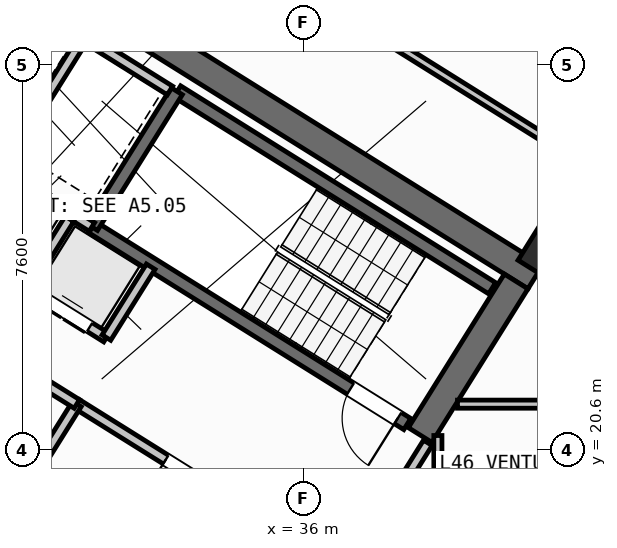
"""IFC4 building model, lengths in metres.
Left out: names, types, materials, properties, quantities, classifications, styles, units other than length and angle.
Written with IfcOpenShell. Run it as: python <this file> out.ifc"""

import sys

from ifc_helpers import new_model, si_unit, direction, frame, frame_2d, origin, origin_2d, place, context, subcontext, project, spatial, rectangle, hollow_rectangle, extrude, source, transform, mapped, element, fill, save


model = new_model("IFC4")
c1 = context("Model", 3, precision=1e-05, world=origin(), true_north=direction((0.0, 1.0)))
c2 = subcontext(c1, "Body", "Model", "MODEL_VIEW")
j1 = project(units=[si_unit("LENGTHUNIT", "METRE"), si_unit("PLANEANGLEUNIT", "RADIAN")], contexts=[c1])
p1 = place(None, origin())
s1 = spatial("IfcSite", under=j1, at=p1, CompositionType="ELEMENT")
p2 = place(p1, origin())
s2 = spatial("IfcBuilding", under=s1, at=p2, CompositionType="ELEMENT")
p3 = place(p2, frame((0.0, 0.0, 184.2)))
s3 = spatial("IfcBuildingStorey", under=s2, at=p3, CompositionType="ELEMENT", Elevation=184.2)
p4 = place(p3, frame((40.573, 24.01, 0.0), z_axis=(0.0, 0.0, 1.0), x_axis=(-0.848047359947, 0.529920442413, 0.0)))
e1 = element("IfcWall", 1, at=p4, inside=s3, PredefinedType="SHEAR", context=c2, shape_type="SweptSolid", body=[
    extrude(rectangle(XDim=13.14, YDim=0.55, at=frame_2d((6.57, 0.0))), origin(), (0.0, 0.0, 1.0), 3.35),
])
p5 = place(p3, frame((40.194, 23.922, 0.0), z_axis=(0.0, 0.0, 1.0), x_axis=(-0.529888438328, -0.848067357541, 0.0)))
e2 = element("IfcWall", 2, at=p5, inside=s3, PredefinedType="SHEAR", context=c2, shape_type="SweptSolid", body=[
    extrude(rectangle(XDim=3.575, YDim=0.55, at=frame_2d((1.788, 0.0))), origin(), (0.0, 0.0, 1.0), 3.35),
])
m1 = source(origin(), c2, "Body", "SweptSolid", [
    extrude(hollow_rectangle(XDim=0.8, YDim=0.8, WallThickness=0.032, at=origin_2d()), origin(), (0.0, 0.0, 1.0), 3.6),
])
p6 = place(p3, frame((40.783, 24.469, 0.0), z_axis=(0.0, 0.0, 1.0), x_axis=(-0.848048096156, 0.529919264233, 0.0)))
e3 = element("IfcColumn", 3, at=p6, inside=s3, PredefinedType="COLUMN", context=c2, shape_type="MappedRepresentation", body=[
    mapped(m1, transform((0.0, 0.0, 0.0), scale=1.0)),
])
p7 = place(p3, frame((31.76, 12.183, 0.0), z_axis=(0.0, 0.0, 1.0), x_axis=(-0.848047074256, 0.529920899612, 0.0)))
e4 = element("IfcWall", 4, at=p7, inside=s3, PredefinedType="STANDARD", context=c2, shape_type="SweptSolid", body=[
    extrude(rectangle(XDim=30.652, YDim=0.32, at=frame_2d((15.326, 0.0))), origin(), (0.0, 0.0, 1.0), 3.35),
])
p8 = place(p7, frame((15.166, 0.0, 0.0)))
e5 = element("IfcOpeningElement", 5, at=p8, cuts=e4, PredefinedType="OPENING", context=c2, shape_type="SweptSolid", body=[
    extrude(rectangle(XDim=1.2, YDim=2.15, at=frame_2d((0.6, 1.075))), frame((0.0, 0.17, 0.0), z_axis=(0.0, -1.0, 0.0), x_axis=(1.0, 0.0, 0.0)), (0.0, 0.0, 1.0), 0.34),
])
p9 = place(p7, frame((2.015, 0.0, 0.8)))
e6 = element("IfcOpeningElement", 6, at=p9, cuts=e4, PredefinedType="OPENING", context=c2, shape_type="SweptSolid", body=[
    extrude(rectangle(XDim=2.1, YDim=1.55, at=frame_2d((1.05, 0.775))), frame((0.0, 0.17, 0.0), z_axis=(0.0, -1.0, 0.0), x_axis=(1.0, 0.0, 0.0)), (0.0, 0.0, 1.0), 0.34),
])
p10 = place(p7, frame((7.244, 0.0, 0.8)))
e7 = element("IfcOpeningElement", 7, at=p10, cuts=e4, PredefinedType="OPENING", context=c2, shape_type="SweptSolid", body=[
    extrude(rectangle(XDim=2.1, YDim=1.55, at=frame_2d((1.05, 0.775))), frame((0.0, 0.17, 0.0), z_axis=(0.0, -1.0, 0.0), x_axis=(1.0, 0.0, 0.0)), (0.0, 0.0, 1.0), 0.34),
])
p11 = place(p7, frame((12.623, 0.0, 1.0)))
e8 = element("IfcOpeningElement", 8, at=p11, cuts=e4, PredefinedType="OPENING", context=c2, shape_type="SweptSolid", body=[
    extrude(rectangle(XDim=0.9, YDim=1.25, at=frame_2d((0.45, 0.625))), frame((0.0, 0.17, 0.0), z_axis=(0.0, -1.0, 0.0), x_axis=(1.0, 0.0, 0.0)), (0.0, 0.0, 1.0), 0.34),
])
p12 = place(p7, frame((19.565, 0.0, 0.95)))
e9 = element("IfcOpeningElement", 9, at=p12, cuts=e4, PredefinedType="OPENING", context=c2, shape_type="SweptSolid", body=[
    extrude(rectangle(XDim=1.2, YDim=1.4, at=frame_2d((0.6, 0.7))), frame((0.0, 0.17, 0.0), z_axis=(0.0, -1.0, 0.0), x_axis=(1.0, 0.0, 0.0)), (0.0, 0.0, 1.0), 0.34),
])
p13 = place(p7, frame((25.983, 0.0, 1.0)))
e10 = element("IfcOpeningElement", 10, at=p13, cuts=e4, PredefinedType="OPENING", context=c2, shape_type="SweptSolid", body=[
    extrude(rectangle(XDim=0.9, YDim=1.25, at=frame_2d((0.45, 0.625))), frame((0.0, 0.17, 0.0), z_axis=(0.0, -1.0, 0.0), x_axis=(1.0, 0.0, 0.0)), (0.0, 0.0, 1.0), 0.34),
])
p14 = place(p7, frame((28.433, 0.0, 1.0)))
e11 = element("IfcOpeningElement", 11, at=p14, cuts=e4, PredefinedType="OPENING", context=c2, shape_type="SweptSolid", body=[
    extrude(rectangle(XDim=0.9, YDim=1.25, at=frame_2d((0.45, 0.625))), frame((0.0, 0.17, 0.0), z_axis=(0.0, -1.0, 0.0), x_axis=(1.0, 0.0, 0.0)), (0.0, 0.0, 1.0), 0.34),
])
p15 = place(p3, frame((31.28, 18.261, 0.0), z_axis=(0.0, 0.0, 1.0), x_axis=(-0.848051618787, 0.529913626805, 0.0)))
e12 = element("IfcWall", 12, at=p15, inside=s3, PredefinedType="SHEAR", context=c2, shape_type="SweptSolid", body=[
    extrude(rectangle(XDim=7.46, YDim=0.26, at=frame_2d((3.73, 0.0))), origin(), (0.0, 0.0, 1.0), 3.35),
])
p16 = place(p15, frame((0.36, 0.0, 0.0)))
e13 = element("IfcOpeningElement", 13, at=p16, cuts=e12, PredefinedType="OPENING", context=c2, shape_type="SweptSolid", body=[
    extrude(rectangle(XDim=0.86, YDim=2.05, at=frame_2d((0.43, 1.025))), frame((0.0, 0.14, 0.0), z_axis=(0.0, -1.0, 0.0), x_axis=(1.0, 0.0, 0.0)), (0.0, 0.0, 1.0), 0.28),
])
p17 = place(p3, frame((39.721, 23.788, 0.0), z_axis=(0.0, 0.0, 1.0), x_axis=(-0.848054434086, 0.529909121291, 0.0)))
e14 = element("IfcWall", 14, at=p17, inside=s3, PredefinedType="SHEAR", context=c2, shape_type="SweptSolid", body=[
    extrude(rectangle(XDim=7.33, YDim=0.26, at=frame_2d((3.665, 0.0))), origin(), (0.0, 0.0, 1.0), 3.35),
])
p18 = place(p3, frame((38.046, 21.108, 0.0), z_axis=(0.0, 0.0, 1.0), x_axis=(-0.848054434086, 0.529909121291, 0.0)))
e15 = element("IfcWall", 15, at=p18, inside=s3, PredefinedType="SHEAR", context=c2, shape_type="SweptSolid", body=[
    extrude(rectangle(XDim=7.33, YDim=0.26, at=frame_2d((3.665, 0.0))), origin(), (0.0, 0.0, 1.0), 3.35),
])
p19 = place(p18, frame((0.22, 0.0, 0.0)))
e16 = element("IfcOpeningElement", 16, at=p19, cuts=e15, PredefinedType="OPENING", context=c2, shape_type="SweptSolid", body=[
    extrude(rectangle(XDim=1.1, YDim=2.1, at=frame_2d((0.55, 1.05))), frame((0.0, 0.14, 0.0), z_axis=(0.0, -1.0, 0.0), x_axis=(1.0, 0.0, 0.0)), (0.0, 0.0, 1.0), 0.28),
])
p20 = place(p3, frame((33.496, 27.677, 0.0), z_axis=(0.0, 0.0, 1.0), x_axis=(-0.529908658664, -0.84805472316, 0.0)))
e17 = element("IfcWall", 17, at=p20, inside=s3, PredefinedType="SHEAR", context=c2, shape_type="SweptSolid", body=[
    extrude(rectangle(XDim=3.16, YDim=0.26, at=frame_2d((1.58, 0.0))), origin(), (0.0, 0.0, 1.0), 3.35),
])
p21 = place(p3, frame((36.417, 18.447, 0.0), z_axis=(0.0, 0.0, 1.0), x_axis=(-0.848064879198, 0.529892404805, 0.0)))
e18 = element("IfcWall", 18, at=p21, inside=s3, PredefinedType="STANDARD", context=c2, shape_type="SweptSolid", body=[
    extrude(rectangle(XDim=5.768, YDim=0.2, at=frame_2d((2.884, 0.0))), origin(), (0.0, 0.0, 1.0), 3.34),
])
p22 = place(p21, frame((2.548, 0.0, 0.0)))
e19 = element("IfcOpeningElement", 19, at=p22, cuts=e18, PredefinedType="OPENING", context=c2, shape_type="SweptSolid", body=[
    extrude(rectangle(XDim=1.15, YDim=2.1, at=frame_2d((0.575, 1.05))), frame((0.0, 0.11, 0.0), z_axis=(0.0, -1.0, 0.0), x_axis=(1.0, 0.0, 0.0)), (0.0, 0.0, 1.0), 0.22),
])
p23 = place(p3, frame((31.822, 24.998, 0.0), z_axis=(0.0, 0.0, 1.0), x_axis=(-0.848036912365, 0.52993716162, 0.0)))
e20 = element("IfcWall", 20, at=p23, inside=s3, PredefinedType="STANDARD", context=c2, shape_type="SweptSolid", body=[
    extrude(rectangle(XDim=4.618, YDim=0.2, at=frame_2d((2.309, 0.0))), origin(), (0.0, 0.0, 1.0), 3.34),
])
p24 = place(p3, frame((32.108, 22.814, 0.0), z_axis=(0.0, 0.0, 1.0), x_axis=(-0.848042229521, 0.529928652696, 0.0)))
e21 = element("IfcWall", 21, at=p24, inside=s3, PredefinedType="STANDARD", context=c2, shape_type="SweptSolid", body=[
    extrude(rectangle(XDim=5.62, YDim=0.2, at=frame_2d((2.81, 0.0))), origin(), (0.0, 0.0, 1.0), 3.34),
])
p25 = place(p24, frame((0.39, 0.0, 0.0)))
e22 = element("IfcOpeningElement", 22, at=p25, cuts=e21, PredefinedType="OPENING", context=c2, shape_type="SweptSolid", body=[
    extrude(rectangle(XDim=1.1, YDim=2.15, at=frame_2d((0.55, 1.075))), frame((0.0, 0.11, 0.0), z_axis=(0.0, -1.0, 0.0), x_axis=(1.0, 0.0, 0.0)), (0.0, 0.0, 1.0), 0.22),
])
p26 = place(p24, frame((2.25, 0.0, 0.0)))
e23 = element("IfcOpeningElement", 23, at=p26, cuts=e21, PredefinedType="OPENING", context=c2, shape_type="SweptSolid", body=[
    extrude(rectangle(XDim=1.1, YDim=2.15, at=frame_2d((0.55, 1.075))), frame((0.0, 0.11, 0.0), z_axis=(0.0, -1.0, 0.0), x_axis=(1.0, 0.0, 0.0)), (0.0, 0.0, 1.0), 0.22),
])
p27 = place(p24, frame((4.11, 0.0, 0.0)))
e24 = element("IfcOpeningElement", 24, at=p27, cuts=e21, PredefinedType="OPENING", context=c2, shape_type="SweptSolid", body=[
    extrude(rectangle(XDim=1.1, YDim=2.15, at=frame_2d((0.55, 1.075))), frame((0.0, 0.11, 0.0), z_axis=(0.0, -1.0, 0.0), x_axis=(1.0, 0.0, 0.0)), (0.0, 0.0, 1.0), 0.22),
])
p28 = place(p3, frame((32.982, 24.213, 0.0), z_axis=(0.0, 0.0, 1.0), x_axis=(-0.529839334948, -0.84809803628, 0.0)))
e25 = element("IfcWall", 25, at=p28, inside=s3, PredefinedType="STANDARD", context=c2, shape_type="SweptSolid", body=[
    extrude(rectangle(XDim=1.65, YDim=0.2, at=frame_2d((0.825, 0.0))), origin(), (0.0, 0.0, 1.0), 3.34),
])
p29 = place(p3, frame((31.645, 28.716, 0.0), z_axis=(0.0, 0.0, 1.0), x_axis=(-0.52986693015, -0.848080795876, 0.0)))
e26 = element("IfcWall", 26, at=p29, inside=s3, PredefinedType="STANDARD", context=c2, shape_type="SweptSolid", body=[
    extrude(rectangle(XDim=2.66, YDim=0.2, at=frame_2d((1.33, 0.0))), origin(), (0.0, 0.0, 1.0), 3.34),
])
p30 = place(p3, frame((33.363, 27.69, 0.0), z_axis=(0.0, 0.0, 1.0), x_axis=(-0.848047090064, 0.529920874315, 0.0)))
e27 = element("IfcWall", 27, at=p30, inside=s3, PredefinedType="STANDARD", context=c2, shape_type="SweptSolid", body=[
    extrude(rectangle(XDim=4.498, YDim=0.2, at=frame_2d((2.249, 0.0))), origin(), (0.0, 0.0, 1.0), 3.34),
])
p31 = place(p3, frame((31.379, 25.156, 0.0), z_axis=(0.0, 0.0, 1.0), x_axis=(-0.529998940003, -0.847998304005, 0.0)))
e28 = element("IfcWall", 28, at=p31, inside=s3, PredefinedType="STANDARD", context=c2, shape_type="SweptSolid", body=[
    extrude(rectangle(XDim=1.58, YDim=0.2, at=frame_2d((0.79, 0.0))), origin(), (0.0, 0.0, 1.0), 3.34),
])
p32 = place(p3, frame((31.525, 21.504, 0.0), z_axis=(0.0, 0.0, 1.0), x_axis=(-0.529907497854, -0.848055448493, 0.0)))
e29 = element("IfcWall", 29, at=p32, inside=s3, PredefinedType="STANDARD", context=c2, shape_type="SweptSolid", body=[
    extrude(rectangle(XDim=2.88, YDim=0.2, at=frame_2d((1.44, 0.0))), origin(), (0.0, 0.0, 1.0), 3.34),
])
p33 = place(p3, frame((31.525, 21.504, 0.0), z_axis=(0.0, 0.0, 1.0), x_axis=(-0.848040211232, 0.529931882541, 0.0)))
e30 = element("IfcWall", 30, at=p33, inside=s3, PredefinedType="STANDARD", context=c2, shape_type="SweptSolid", body=[
    extrude(rectangle(XDim=6.218, YDim=0.2, at=frame_2d((3.109, 0.0))), origin(), (0.0, 0.0, 1.0), 3.34),
])
p34 = place(p33, frame((4.4, 0.0, 0.0)))
e31 = element("IfcOpeningElement", 31, at=p34, cuts=e30, PredefinedType="OPENING", context=c2, shape_type="SweptSolid", body=[
    extrude(rectangle(XDim=0.86, YDim=2.05, at=frame_2d((0.43, 1.025))), frame((0.0, 0.11, 0.0), z_axis=(0.0, -1.0, 0.0), x_axis=(1.0, 0.0, 0.0)), (0.0, 0.0, 1.0), 0.22),
])
p35 = place(p33, frame((1.45, 0.0, 0.0)))
e32 = element("IfcOpeningElement", 32, at=p35, cuts=e30, PredefinedType="OPENING", context=c2, shape_type="SweptSolid", body=[
    extrude(rectangle(XDim=0.86, YDim=2.05, at=frame_2d((0.43, 1.025))), frame((0.0, 0.11, 0.0), z_axis=(0.0, -1.0, 0.0), x_axis=(1.0, 0.0, 0.0)), (0.0, 0.0, 1.0), 0.22),
])
p36 = place(p3, frame((41.936, 26.012, 0.0), z_axis=(0.0, 0.0, 1.0), x_axis=(-0.848051154596, 0.529914369676, 0.0)))
e33 = element("IfcWall", 33, at=p36, inside=s3, PredefinedType="PARTITIONING", context=c2, shape_type="SweptSolid", body=[
    extrude(rectangle(XDim=15.57, YDim=0.16, at=frame_2d((7.785, 0.0))), origin(), (0.0, 0.0, 1.0), 3.34),
])
p37 = place(p36, frame((10.83, 0.0, 0.0)))
e34 = element("IfcOpeningElement", 34, at=p37, cuts=e33, PredefinedType="OPENING", context=c2, shape_type="SweptSolid", body=[
    extrude(rectangle(XDim=1.0, YDim=2.1, at=frame_2d((0.5, 1.05))), frame((0.0, 0.09, 0.0), z_axis=(0.0, -1.0, 0.0), x_axis=(1.0, 0.0, 0.0)), (0.0, 0.0, 1.0), 0.18),
])
p38 = place(p3, frame((38.451, 20.737, 0.0), z_axis=(0.0, 0.0, 1.0), x_axis=(-0.529924799939, -0.848044637038, 0.0)))
e35 = element("IfcWall", 35, at=p38, inside=s3, PredefinedType="STANDARD", context=c2, shape_type="SweptSolid", body=[
    extrude(rectangle(XDim=2.96, YDim=0.2, at=frame_2d((1.48, 0.0))), origin(), (0.0, 0.0, 1.0), 3.34),
])
p39 = place(p38, frame((1.46, 0.0, 0.0)))
e36 = element("IfcOpeningElement", 36, at=p39, cuts=e35, PredefinedType="OPENING", context=c2, shape_type="SweptSolid", body=[
    extrude(rectangle(XDim=0.86, YDim=2.05, at=frame_2d((0.43, 1.025))), frame((0.0, 0.11, 0.0), z_axis=(0.0, -1.0, 0.0), x_axis=(1.0, 0.0, 0.0)), (0.0, 0.0, 1.0), 0.22),
])
p40 = place(p3, frame((38.65, 17.93, 0.0), z_axis=(0.0, 0.0, 1.0), x_axis=(0.0, 1.0, 0.0)))
e37 = element("IfcWall", 37, at=p40, inside=s3, PredefinedType="PARTITIONING", context=c2, shape_type="SweptSolid", body=[
    extrude(rectangle(XDim=2.951, YDim=0.16, at=frame_2d((1.476, 0.0))), origin(), (0.0, 0.0, 1.0), 3.34),
])
p41 = place(p3, frame((39.037, 21.5, 0.0), z_axis=(0.0, 0.0, 1.0), x_axis=(1.0, 0.0, 0.0)))
e38 = element("IfcWall", 38, at=p41, inside=s3, PredefinedType="PARTITIONING", context=c2, shape_type="SweptSolid", body=[
    extrude(rectangle(XDim=7.215, YDim=0.16, at=frame_2d((3.607, 0.0))), origin(), (0.0, 0.0, 1.0), 3.34),
])
m2 = source(origin(), c2, "Body", "SweptSolid", [
    extrude(rectangle(XDim=1.1, YDim=2.1, at=frame_2d((0.55, 1.05))), frame((0.0, 0.025, 0.0), z_axis=(0.0, -1.0, 0.0), x_axis=(1.0, 0.0, 0.0)), (0.0, 0.0, 1.0), 0.05),
])
p42 = place(p19, origin())
e39 = element("IfcDoor", 39, at=p42, inside=s3, OperationType="SINGLE_SWING_LEFT", PredefinedType="DOOR", context=c2, shape_type="MappedRepresentation", body=[
    mapped(m2, transform((0.0, 0.0, 0.0), scale=1.0)),
])
fill(e16, e39)
m3 = source(origin(), c2, "Body", "SweptSolid", [
    extrude(rectangle(XDim=1.15, YDim=2.1, at=frame_2d((0.575, 1.05))), frame((0.0, 0.025, 0.0), z_axis=(0.0, -1.0, 0.0), x_axis=(1.0, 0.0, 0.0)), (0.0, 0.0, 1.0), 0.05),
])
p43 = place(p22, origin())
e40 = element("IfcDoor", 40, at=p43, inside=s3, OperationType="SINGLE_SWING_RIGHT", PredefinedType="DOOR", context=c2, shape_type="MappedRepresentation", body=[
    mapped(m3, transform((0.0, 0.0, 0.0), scale=1.0)),
])
fill(e19, e40)
m4 = source(origin(), c2, "Body", "SweptSolid", [
    extrude(rectangle(XDim=1.1, YDim=2.15, at=frame_2d((0.55, 1.075))), frame((0.0, 0.025, 0.0), z_axis=(0.0, -1.0, 0.0), x_axis=(1.0, 0.0, 0.0)), (0.0, 0.0, 1.0), 0.05),
])
p44 = place(p25, origin())
e41 = element("IfcDoor", 41, at=p44, inside=s3, OperationType="DOUBLE_DOOR_SLIDING", PredefinedType="DOOR", context=c2, shape_type="MappedRepresentation", body=[
    mapped(m4, transform((0.0, 0.0, 0.0), scale=1.0)),
])
fill(e22, e41)
save(model, sys.argv[1])
